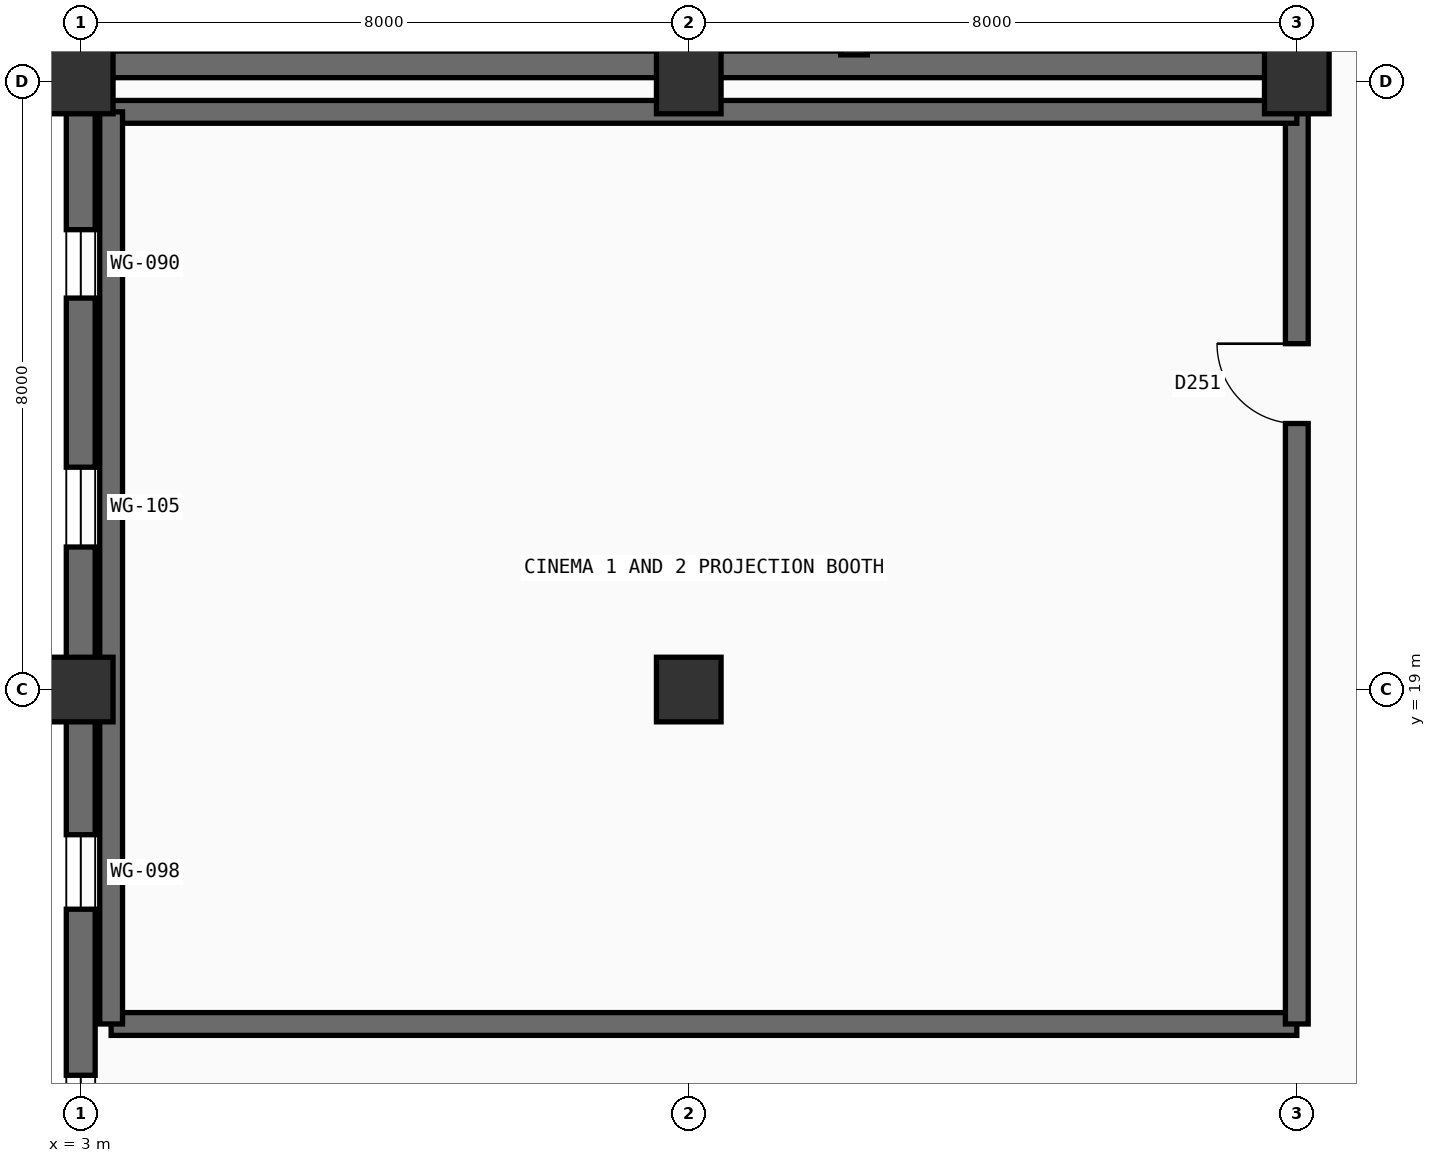
"""IFC4 building model, lengths in metres.
Left out: names, types, materials, properties, quantities, classifications, styles, units other than length and angle.
Written with IfcOpenShell. Run it as: python <this file> out.ifc"""

import sys

from ifc_helpers import new_model, si_unit, direction, frame, frame_2d, origin, origin_2d, place, context, subcontext, project, spatial, rectangle, extrude, element, fill, save


model = new_model("IFC4")
c1 = context("Model", 3, precision=1e-05, world=origin(), true_north=direction((0.0, 1.0)))
c2 = subcontext(c1, "Body", "Model", "MODEL_VIEW")
j1 = project(units=[si_unit("LENGTHUNIT", "METRE"), si_unit("PLANEANGLEUNIT", "RADIAN")], contexts=[c1])
p1 = place(None, origin())
s1 = spatial("IfcSite", under=j1, at=p1, CompositionType="ELEMENT")
p2 = place(p1, origin())
s2 = spatial("IfcBuilding", under=s1, at=p2, CompositionType="ELEMENT")
p3 = place(p2, frame((0.0, 0.0, 5.4)))
s3 = spatial("IfcBuildingStorey", under=s2, at=p3, CompositionType="ELEMENT", Elevation=5.4)
for number, where, z_axis, x_axis in (
    (1, (3.0, 19.0, 0.0), (0.0, 0.0, 1.0), (1.0, 0.0, 0.0)),
    (2, (3.0, 27.0, 0.0), (0.0, 0.0, 1.0), (1.0, 0.0, 0.0)),
    (3, (11.0, 19.0, 0.0), (0.0, 0.0, 1.0), (1.0, 0.0, 0.0)),
    (4, (11.0, 27.0, 0.0), (0.0, 0.0, 1.0), (1.0, 0.0, 0.0)),
    (5, (19.0, 27.0, 0.0), (0.0, 0.0, 1.0), (1.0, 0.0, 0.0)),
):
    element("IfcColumn", number, at=place(p3, frame(where, z_axis=z_axis, x_axis=x_axis)), inside=s3, PredefinedType="COLUMN", context=c2, shape_type="SweptSolid", body=[
        extrude(rectangle(XDim=0.85, YDim=0.85, at=origin_2d()), origin(), (0.0, 0.0, 1.0), 4.5),
    ])
p4 = place(p3, frame((3.0, 11.0, 0.0), z_axis=(0.0, 0.0, 1.0), x_axis=(0.0, 1.0, 0.0)))
e6 = element("IfcWall", 6, at=p4, inside=s3, PredefinedType="SOLIDWALL", context=c2, shape_type="SweptSolid", body=[
    extrude(rectangle(XDim=8.0, YDim=0.38, at=frame_2d((4.0, 0.0))), origin(), (0.0, 0.0, 1.0), 4.5),
])
p5 = place(p4, frame((1.875, 0.0, 1.05)))
e7 = element("IfcOpeningElement", 7, at=p5, cuts=e6, PredefinedType="OPENING", context=c2, shape_type="SweptSolid", body=[
    extrude(rectangle(XDim=1.05, YDim=1.7, at=frame_2d((0.525, 0.85))), frame((0.0, 0.2, 0.0), z_axis=(0.0, -1.0, 0.0), x_axis=(1.0, 0.0, 0.0)), (0.0, 0.0, 1.0), 0.4),
])
p6 = place(p4, frame((5.11, 0.0, 1.05)))
e8 = element("IfcOpeningElement", 8, at=p6, cuts=e6, PredefinedType="OPENING", context=c2, shape_type="SweptSolid", body=[
    extrude(rectangle(XDim=0.98, YDim=1.6, at=frame_2d((0.49, 0.8))), frame((0.0, 0.2, 0.0), z_axis=(0.0, -1.0, 0.0), x_axis=(1.0, 0.0, 0.0)), (0.0, 0.0, 1.0), 0.4),
])
p7 = place(p3, frame((3.0, 19.0, 0.0), z_axis=(0.0, 0.0, 1.0), x_axis=(0.0, 1.0, 0.0)))
e9 = element("IfcWall", 9, at=p7, inside=s3, PredefinedType="SOLIDWALL", context=c2, shape_type="SweptSolid", body=[
    extrude(rectangle(XDim=8.0, YDim=0.38, at=frame_2d((4.0, 0.0))), origin(), (0.0, 0.0, 1.0), 4.5),
])
p8 = place(p7, frame((1.875, 0.0, 1.05)))
e10 = element("IfcOpeningElement", 10, at=p8, cuts=e9, PredefinedType="OPENING", context=c2, shape_type="SweptSolid", body=[
    extrude(rectangle(XDim=1.05, YDim=1.7, at=frame_2d((0.525, 0.85))), frame((0.0, 0.2, 0.0), z_axis=(0.0, -1.0, 0.0), x_axis=(1.0, 0.0, 0.0)), (0.0, 0.0, 1.0), 0.4),
])
p9 = place(p7, frame((5.15, 0.0, 1.05)))
e11 = element("IfcOpeningElement", 11, at=p9, cuts=e9, PredefinedType="OPENING", context=c2, shape_type="SweptSolid", body=[
    extrude(rectangle(XDim=0.9, YDim=1.5, at=frame_2d((0.45, 0.75))), frame((0.0, 0.2, 0.0), z_axis=(0.0, -1.0, 0.0), x_axis=(1.0, 0.0, 0.0)), (0.0, 0.0, 1.0), 0.4),
])
p10 = place(p3, frame((3.0, 27.0, 0.0), z_axis=(0.0, 0.0, 1.0), x_axis=(0.0, 1.0, 0.0)))
e12 = element("IfcWall", 12, at=p10, inside=s3, PredefinedType="SOLIDWALL", context=c2, shape_type="SweptSolid", body=[
    extrude(rectangle(XDim=8.0, YDim=0.38, at=frame_2d((4.0, 0.0))), origin(), (0.0, 0.0, 1.0), 4.5),
])
p11 = place(p3, frame((3.2, 27.225, 0.0), z_axis=(0.0, 0.0, 1.0), x_axis=(1.0, 0.0, 0.0)))
e13 = element("IfcWall", 13, at=p11, inside=s3, PredefinedType="SHEAR", context=c2, shape_type="SweptSolid", body=[
    extrude(rectangle(XDim=15.6, YDim=0.35, at=frame_2d((7.8, 0.0))), origin(), (0.0, 0.0, 1.0), 4.2),
])
p12 = place(p3, frame((13.175, 27.35, 0.0), z_axis=(0.0, 0.0, 1.0), x_axis=(0.0, 1.0, 0.0)))
e14 = element("IfcWall", 14, at=p12, inside=s3, PredefinedType="SHEAR", context=c2, shape_type="SweptSolid", body=[
    extrude(rectangle(XDim=4.425, YDim=0.35, at=frame_2d((2.212, 0.0))), origin(), (0.0, 0.0, 1.0), 4.2),
])
p13 = place(p3, frame((18.775, 27.2, 0.0), z_axis=(0.0, 0.0, 1.0), x_axis=(0.0, 1.0, 0.0)))
e15 = element("IfcWall", 15, at=p13, inside=s3, PredefinedType="SHEAR", context=c2, shape_type="SweptSolid", body=[
    extrude(rectangle(XDim=7.6, YDim=0.35, at=frame_2d((3.8, 0.0))), origin(), (0.0, 0.0, 1.0), 4.2),
])
p14 = place(p13, frame((5.1, 0.0, 0.0)))
e16 = element("IfcOpeningElement", 16, at=p14, cuts=e15, PredefinedType="OPENING", context=c2, shape_type="SweptSolid", body=[
    extrude(rectangle(XDim=1.5, YDim=2.2, at=frame_2d((0.75, 1.1))), frame((0.0, 0.185, 0.0), z_axis=(0.0, -1.0, 0.0), x_axis=(1.0, 0.0, 0.0)), (0.0, 0.0, 1.0), 0.37),
])
p15 = place(p3, frame((3.4, 14.6, 0.0), z_axis=(0.0, 0.0, 1.0), x_axis=(1.0, 0.0, 0.0)))
e17 = element("IfcWall", 17, at=p15, inside=s3, PredefinedType="SHEAR", context=c2, shape_type="SweptSolid", body=[
    extrude(rectangle(XDim=15.6, YDim=0.3, at=frame_2d((7.8, 0.0))), origin(), (0.0, 0.0, 1.0), 4.2),
])
p16 = place(p3, frame((19.0, 14.6, 0.0), z_axis=(0.0, 0.0, 1.0), x_axis=(0.0, 1.0, 0.0)))
e18 = element("IfcWall", 18, at=p16, inside=s3, PredefinedType="SHEAR", context=c2, shape_type="SweptSolid", body=[
    extrude(rectangle(XDim=12.0, YDim=0.3, at=frame_2d((6.0, 0.0))), origin(), (0.0, 0.0, 1.0), 4.2),
])
p17 = place(p16, frame((7.9, 0.0, 0.0)))
e19 = element("IfcOpeningElement", 19, at=p17, cuts=e18, PredefinedType="OPENING", context=c2, shape_type="SweptSolid", body=[
    extrude(rectangle(XDim=1.05, YDim=2.16, at=frame_2d((0.525, 1.08))), frame((0.0, 0.16, 0.0), z_axis=(0.0, -1.0, 0.0), x_axis=(1.0, 0.0, 0.0)), (0.0, 0.0, 1.0), 0.32),
])
p18 = place(p3, frame((3.4, 26.6, 0.0), z_axis=(0.0, 0.0, 1.0), x_axis=(1.0, 0.0, 0.0)))
e20 = element("IfcWall", 20, at=p18, inside=s3, PredefinedType="SHEAR", context=c2, shape_type="SweptSolid", body=[
    extrude(rectangle(XDim=15.6, YDim=0.3, at=frame_2d((7.8, 0.0))), origin(), (0.0, 0.0, 1.0), 4.2),
])
p19 = place(p3, frame((3.4, 14.6, 0.0), z_axis=(0.0, 0.0, 1.0), x_axis=(0.0, 1.0, 0.0)))
e21 = element("IfcWall", 21, at=p19, inside=s3, PredefinedType="SHEAR", context=c2, shape_type="SweptSolid", body=[
    extrude(rectangle(XDim=12.0, YDim=0.3, at=frame_2d((6.0, 0.0))), origin(), (0.0, 0.0, 1.0), 4.2),
])
p20 = place(p5, origin())
e22 = element("IfcWindow", 22, at=p20, inside=s3, PartitioningType="SINGLE_PANEL", PredefinedType="WINDOW", context=c2, shape_type="SweptSolid", body=[
    extrude(rectangle(XDim=1.05, YDim=1.7, at=frame_2d((0.525, 0.85))), frame((0.0, 0.03, 0.0), z_axis=(0.0, -1.0, 0.0), x_axis=(1.0, 0.0, 0.0)), (0.0, 0.0, 1.0), 0.06),
])
fill(e7, e22)
p21 = place(p6, origin())
e23 = element("IfcWindow", 23, at=p21, inside=s3, PartitioningType="SINGLE_PANEL", PredefinedType="WINDOW", context=c2, shape_type="SweptSolid", body=[
    extrude(rectangle(XDim=0.98, YDim=1.6, at=frame_2d((0.49, 0.8))), frame((0.0, 0.03, 0.0), z_axis=(0.0, -1.0, 0.0), x_axis=(1.0, 0.0, 0.0)), (0.0, 0.0, 1.0), 0.06),
])
fill(e8, e23)
p22 = place(p8, origin())
e24 = element("IfcWindow", 24, at=p22, inside=s3, PartitioningType="SINGLE_PANEL", PredefinedType="WINDOW", context=c2, shape_type="SweptSolid", body=[
    extrude(rectangle(XDim=1.05, YDim=1.7, at=frame_2d((0.525, 0.85))), frame((0.0, 0.03, 0.0), z_axis=(0.0, -1.0, 0.0), x_axis=(1.0, 0.0, 0.0)), (0.0, 0.0, 1.0), 0.06),
])
fill(e10, e24)
p23 = place(p9, origin())
e25 = element("IfcWindow", 25, at=p23, inside=s3, PartitioningType="SINGLE_PANEL", PredefinedType="WINDOW", context=c2, shape_type="SweptSolid", body=[
    extrude(rectangle(XDim=0.9, YDim=1.5, at=frame_2d((0.45, 0.75))), frame((0.0, 0.03, 0.0), z_axis=(0.0, -1.0, 0.0), x_axis=(1.0, 0.0, 0.0)), (0.0, 0.0, 1.0), 0.06),
])
fill(e11, e25)
p24 = place(p17, origin())
e26 = element("IfcDoor", 26, at=p24, inside=s3, OperationType="SINGLE_SWING_RIGHT", PredefinedType="DOOR", context=c2, shape_type="SweptSolid", body=[
    extrude(rectangle(XDim=1.05, YDim=2.16, at=frame_2d((0.525, 1.08))), frame((0.0, 0.025, 0.0), z_axis=(0.0, -1.0, 0.0), x_axis=(1.0, 0.0, 0.0)), (0.0, 0.0, 1.0), 0.05),
])
fill(e19, e26)
save(model, sys.argv[1])
